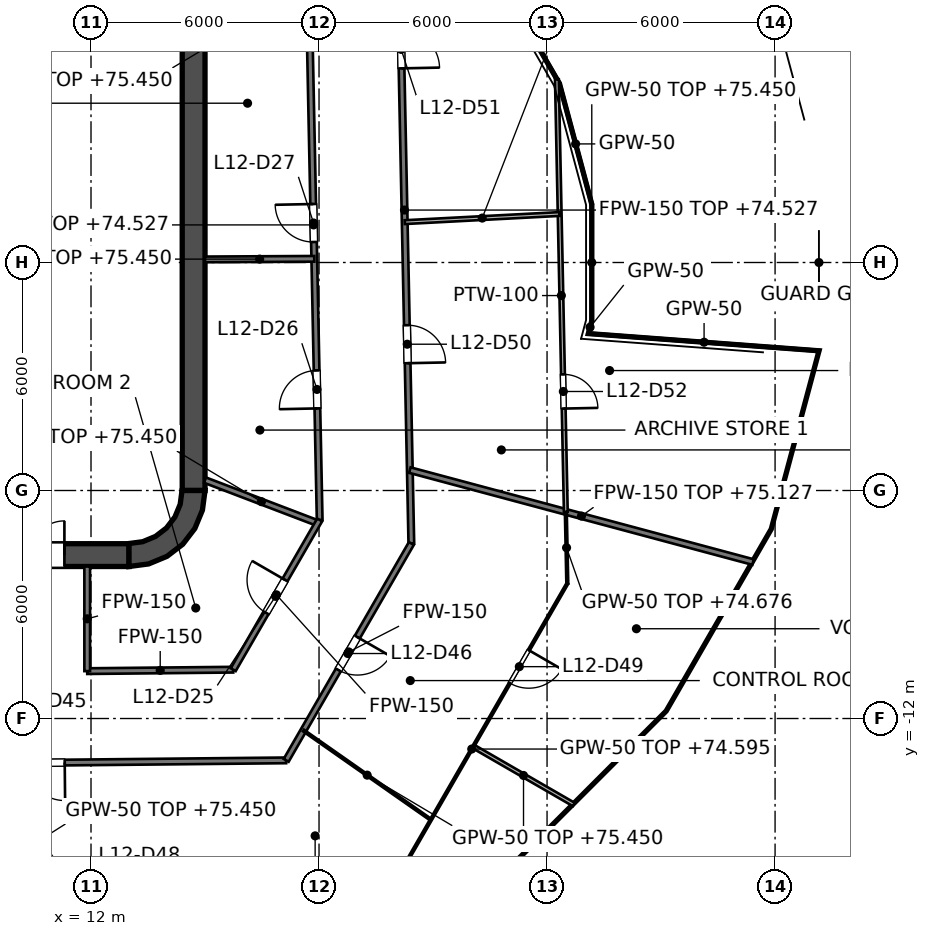
"""IFC4 building model, lengths in metres.
Left out: names, types, materials, properties, quantities, classifications, styles, units other than length and angle.
Written with IfcOpenShell. Run it as: python <this file> out.ifc"""

import sys

from ifc_helpers import new_model, si_unit, direction, frame, frame_2d, origin, place, context, subcontext, project, spatial, polyline, rectangle, outline, extrude, element, fill, save


model = new_model("IFC4")
c1 = context("Model", 3, precision=1e-05, world=origin(), true_north=direction((0.0, 1.0)))
c2 = subcontext(c1, "Body", "Model", "MODEL_VIEW")
j1 = project(units=[si_unit("LENGTHUNIT", "METRE"), si_unit("PLANEANGLEUNIT", "RADIAN")], contexts=[c1])
p1 = place(None, origin())
s1 = spatial("IfcSite", under=j1, at=p1, CompositionType="ELEMENT")
p2 = place(p1, origin())
s2 = spatial("IfcBuilding", under=s1, at=p2, CompositionType="ELEMENT")
p3 = place(p2, frame((0.0, 0.0, 71.4)))
s3 = spatial("IfcBuildingStorey", under=s2, at=p3, CompositionType="ELEMENT", Elevation=71.4)
p4 = place(p3, frame((-13.0, -7.7, 0.0), z_axis=(0.0, 0.0, 1.0), x_axis=(1.0, 0.0, 0.0)))
e1 = element("IfcWall", 1, at=p4, inside=s3, PredefinedType="SHEAR", context=c2, shape_type="SweptSolid", body=[
    extrude(rectangle(XDim=26.0, YDim=0.6, at=frame_2d((13.0, 0.0))), origin(), (0.0, 0.0, 1.0), 4.2),
])
p5 = place(p4, frame((1.7, 0.0, 0.0)))
e2 = element("IfcOpeningElement", 2, at=p5, cuts=e1, PredefinedType="OPENING", context=c2, shape_type="SweptSolid", body=[
    extrude(rectangle(XDim=1.8, YDim=2.1, at=frame_2d((0.9, 1.05))), frame((0.0, 0.3, 0.0), z_axis=(0.0, -1.0, 0.0), x_axis=(1.0, 0.0, 0.0)), (0.0, 0.0, 1.0), 0.6),
])
p6 = place(p4, frame((22.5, 0.0, 0.0)))
e3 = element("IfcOpeningElement", 3, at=p6, cuts=e1, PredefinedType="OPENING", context=c2, shape_type="SweptSolid", body=[
    extrude(rectangle(XDim=1.8, YDim=2.1, at=frame_2d((0.9, 1.05))), frame((0.0, 0.3, 0.0), z_axis=(0.0, -1.0, 0.0), x_axis=(1.0, 0.0, 0.0)), (0.0, 0.0, 1.0), 0.6),
])
p7 = place(p3, frame((14.7, -6.0, 0.0), z_axis=(0.0, 0.0, 1.0), x_axis=(0.0, 1.0, 0.0)))
e4 = element("IfcWall", 4, at=p7, inside=s3, PredefinedType="SHEAR", context=c2, shape_type="SweptSolid", body=[
    extrude(rectangle(XDim=12.0, YDim=0.6, at=frame_2d((6.0, 0.0))), origin(), (0.0, 0.0, 1.0), 4.2),
])
p8 = place(p3, origin())
e5 = element("IfcWall", 5, at=p8, inside=s3, PredefinedType="SHEAR", context=c2, shape_type="SweptSolid", body=[
    extrude(outline(polyline([(15.0, -6.0), (14.395, -6.0), (14.347, -6.361), (14.208, -6.698), (13.986, -6.986), (13.698, -7.208), (13.361, -7.347), (13.0, -7.395), (13.0, -8.0), (13.518, -7.932), (14.0, -7.732), (14.414, -7.414), (14.732, -7.0), (14.932, -6.518), (15.0, -6.0)])), origin(), (0.0, 0.0, 1.0), 4.2),
])
p9 = place(p3, frame((11.8, -7.4, 0.0), z_axis=(0.0, 0.0, 1.0), x_axis=(0.0, 1.0, 0.0)))
e6 = element("IfcWall", 6, at=p9, inside=s3, PredefinedType="SOLIDWALL", context=c2, shape_type="SweptSolid", body=[
    extrude(rectangle(XDim=14.8, YDim=0.4, at=frame_2d((7.4, 0.0))), origin(), (0.0, 0.0, 1.0), 4.05),
])
p10 = place(p9, frame((11.2, 0.0, 0.0)))
e7 = element("IfcOpeningElement", 7, at=p10, cuts=e6, PredefinedType="OPENING", context=c2, shape_type="SweptSolid", body=[
    extrude(rectangle(XDim=1.1, YDim=2.1, at=frame_2d((0.55, 1.05))), frame((0.0, 0.2, 0.0), z_axis=(0.0, -1.0, 0.0), x_axis=(1.0, 0.0, 0.0)), (0.0, 0.0, 1.0), 0.4),
])
p11 = place(p9, frame((8.3, 0.0, 0.0)))
e8 = element("IfcOpeningElement", 8, at=p11, cuts=e6, PredefinedType="OPENING", context=c2, shape_type="SweptSolid", body=[
    extrude(rectangle(XDim=1.1, YDim=2.1, at=frame_2d((0.55, 1.05))), frame((0.0, 0.2, 0.0), z_axis=(0.0, -1.0, 0.0), x_axis=(1.0, 0.0, 0.0)), (0.0, 0.0, 1.0), 0.4),
])
p12 = place(p9, frame((5.4, 0.0, 0.0)))
e9 = element("IfcOpeningElement", 9, at=p12, cuts=e6, PredefinedType="OPENING", context=c2, shape_type="SweptSolid", body=[
    extrude(rectangle(XDim=1.1, YDim=2.1, at=frame_2d((0.55, 1.05))), frame((0.0, 0.2, 0.0), z_axis=(0.0, -1.0, 0.0), x_axis=(1.0, 0.0, 0.0)), (0.0, 0.0, 1.0), 0.4),
])
p13 = place(p9, frame((13.552, 0.0, 0.0)))
e10 = element("IfcOpeningElement", 10, at=p13, cuts=e6, PredefinedType="OPENING", context=c2, shape_type="SweptSolid", body=[
    extrude(rectangle(XDim=0.9, YDim=2.1, at=frame_2d((0.45, 1.05))), frame((0.0, 0.2, 0.0), z_axis=(0.0, -1.0, 0.0), x_axis=(1.0, 0.0, 0.0)), (0.0, 0.0, 1.0), 0.4),
])
p14 = place(p9, frame((0.347, 0.0, 0.0)))
e11 = element("IfcOpeningElement", 11, at=p14, cuts=e6, PredefinedType="OPENING", context=c2, shape_type="SweptSolid", body=[
    extrude(rectangle(XDim=0.9, YDim=2.1, at=frame_2d((0.45, 1.05))), frame((0.0, 0.2, 0.0), z_axis=(0.0, -1.0, 0.0), x_axis=(1.0, 0.0, 0.0)), (0.0, 0.0, 1.0), 0.4),
])
e12 = element("IfcWall", 12, at=p8, inside=s3, PredefinedType="SOLIDWALL", context=c2, shape_type="SweptSolid", body=[
    extrude(outline(polyline([(12.0, -5.675), (12.0, -5.925), (14.15, -5.925), (14.4, -5.925), (14.4, -5.675), (14.4, -3.025), (14.4, -2.775), (14.4, -0.125), (14.4, 0.125), (14.4, 2.775), (14.4, 3.025), (14.4, 5.675), (14.4, 5.925), (14.15, 5.925), (12.0, 5.925), (12.0, 5.675), (14.15, 5.675), (14.15, 3.025), (12.0, 3.025), (12.0, 2.775), (14.15, 2.775), (14.15, 0.125), (12.0, 0.125), (12.0, -0.125), (14.15, -0.125), (14.15, -2.775), (12.0, -2.775), (12.0, -3.025), (14.15, -3.025), (14.15, -5.675), (12.0, -5.675)])), origin(), (0.0, 0.0, 1.0), 4.05),
])
p15 = place(p3, frame((17.697, 8.753, 0.0), z_axis=(0.0, 0.0, 1.0), x_axis=(0.020608181841, -0.99978762887, 0.0)))
e13 = element("IfcWall", 13, at=p15, inside=s3, PredefinedType="PARTITIONING", context=c2, shape_type="SweptSolid", body=[
    extrude(rectangle(XDim=15.531, YDim=0.15, at=frame_2d((7.766, 0.0))), origin(), (0.0, 0.0, 1.0), 3.127),
])
p16 = place(p15, frame((11.596, 0.0, 0.0)))
e14 = element("IfcOpeningElement", 14, at=p16, cuts=e13, PredefinedType="OPENING", context=c2, shape_type="SweptSolid", body=[
    extrude(rectangle(XDim=1.0, YDim=2.1, at=frame_2d((0.5, 1.05))), frame((0.0, 0.075, 0.0), z_axis=(0.0, -1.0, 0.0), x_axis=(1.0, 0.0, 0.0)), (0.0, 0.0, 1.0), 0.15),
])
p17 = place(p15, frame((7.216, 0.0, 0.0)))
e15 = element("IfcOpeningElement", 15, at=p17, cuts=e13, PredefinedType="OPENING", context=c2, shape_type="SweptSolid", body=[
    extrude(rectangle(XDim=1.0, YDim=2.1, at=frame_2d((0.5, 1.05))), frame((0.0, 0.075, 0.0), z_axis=(0.0, -1.0, 0.0), x_axis=(1.0, 0.0, 0.0)), (0.0, 0.0, 1.0), 0.15),
])
p18 = place(p3, frame((20.067, 10.155, 0.0), z_axis=(0.0, 0.0, 1.0), x_axis=(0.020611882214, -0.999787552589, 0.0)))
e16 = element("IfcWall", 16, at=p18, inside=s3, PredefinedType="PARTITIONING", context=c2, shape_type="SweptSolid", body=[
    extrude(rectangle(XDim=17.554, YDim=0.15, at=frame_2d((8.777, 0.0))), origin(), (0.0, 0.0, 1.0), 3.127),
])
p19 = place(p18, frame((11.808, 0.0, 0.0)))
e17 = element("IfcOpeningElement", 17, at=p19, cuts=e16, PredefinedType="OPENING", context=c2, shape_type="SweptSolid", body=[
    extrude(rectangle(XDim=1.0, YDim=2.1, at=frame_2d((0.5, 1.05))), frame((0.0, 0.075, 0.0), z_axis=(0.0, -1.0, 0.0), x_axis=(1.0, 0.0, 0.0)), (0.0, 0.0, 1.0), 0.15),
])
p20 = place(p18, frame((4.048, 0.0, 0.0)))
e18 = element("IfcOpeningElement", 18, at=p20, cuts=e16, PredefinedType="OPENING", context=c2, shape_type="SweptSolid", body=[
    extrude(rectangle(XDim=1.0, YDim=2.1, at=frame_2d((0.5, 1.05))), frame((0.0, 0.075, 0.0), z_axis=(0.0, -1.0, 0.0), x_axis=(1.0, 0.0, 0.0)), (0.0, 0.0, 1.0), 0.15),
])
p21 = place(p3, frame((15.0, -5.727, 0.0), z_axis=(0.0, 0.0, 1.0), x_axis=(0.934237940374, -0.356650348053, 0.0)))
e19 = element("IfcWall", 19, at=p21, inside=s3, PredefinedType="PARTITIONING", context=c2, shape_type="SweptSolid", body=[
    extrude(rectangle(XDim=3.177, YDim=0.15, at=frame_2d((1.588, 0.0))), origin(), (0.0, 0.0, 1.0), 4.05),
])
p22 = place(p3, frame((20.39, -5.463, 0.0), z_axis=(0.0, 0.0, 1.0), x_axis=(0.965917395295, -0.25885050795, 0.0)))
e20 = element("IfcWall", 20, at=p22, inside=s3, PredefinedType="PARTITIONING", context=c2, shape_type="SweptSolid", body=[
    extrude(rectangle(XDim=9.35, YDim=0.15, at=frame_2d((4.675, 0.0))), origin(), (0.0, 0.0, 1.0), 3.727),
])
p23 = place(p3, frame((15.0, 0.081, 0.0), z_axis=(0.0, 0.0, 1.0), x_axis=(0.999985231896, 0.005434702347, 0.0)))
e21 = element("IfcWall", 21, at=p23, inside=s3, PredefinedType="PARTITIONING", context=c2, shape_type="SweptSolid", body=[
    extrude(rectangle(XDim=2.875, YDim=0.15, at=frame_2d((1.438, 0.0))), origin(), (0.0, 0.0, 1.0), 4.05),
])
p24 = place(p3, frame((-14.049, -13.411, 0.0), z_axis=(0.0, 0.0, 1.0), x_axis=(0.999950729089, 0.009926701045, 0.0)))
e22 = element("IfcWall", 22, at=p24, inside=s3, PredefinedType="PARTITIONING", context=c2, shape_type="SweptSolid", body=[
    extrude(rectangle(XDim=31.186, YDim=0.15, at=frame_2d((15.593, 0.0))), origin(), (0.0, 0.0, 1.0), 3.127),
])
p25 = place(p24, frame((5.733, 0.0, 0.0)))
e23 = element("IfcOpeningElement", 23, at=p25, cuts=e22, PredefinedType="OPENING", context=c2, shape_type="SweptSolid", body=[
    extrude(rectangle(XDim=1.0, YDim=2.1, at=frame_2d((0.5, 1.05))), frame((0.0, 0.075, 0.0), z_axis=(0.0, -1.0, 0.0), x_axis=(1.0, 0.0, 0.0)), (0.0, 0.0, 1.0), 0.15),
])
p26 = place(p24, frame((14.08, 0.0, 0.0)))
e24 = element("IfcOpeningElement", 24, at=p26, cuts=e22, PredefinedType="OPENING", context=c2, shape_type="SweptSolid", body=[
    extrude(rectangle(XDim=1.0, YDim=2.1, at=frame_2d((0.5, 1.05))), frame((0.0, 0.075, 0.0), z_axis=(0.0, -1.0, 0.0), x_axis=(1.0, 0.0, 0.0)), (0.0, 0.0, 1.0), 0.15),
])
p27 = place(p24, frame((15.996, 0.0, 0.0)))
e25 = element("IfcOpeningElement", 25, at=p27, cuts=e22, PredefinedType="OPENING", context=c2, shape_type="SweptSolid", body=[
    extrude(rectangle(XDim=1.0, YDim=2.1, at=frame_2d((0.5, 1.05))), frame((0.0, 0.075, 0.0), z_axis=(0.0, -1.0, 0.0), x_axis=(1.0, 0.0, 0.0)), (0.0, 0.0, 1.0), 0.15),
])
p28 = place(p24, frame((19.94, 0.0, 0.0)))
e26 = element("IfcOpeningElement", 26, at=p28, cuts=e22, PredefinedType="OPENING", context=c2, shape_type="SweptSolid", body=[
    extrude(rectangle(XDim=1.0, YDim=2.1, at=frame_2d((0.5, 1.05))), frame((0.0, 0.075, 0.0), z_axis=(0.0, -1.0, 0.0), x_axis=(1.0, 0.0, 0.0)), (0.0, 0.0, 1.0), 0.15),
])
p29 = place(p24, frame((24.359, 0.0, 0.0)))
e27 = element("IfcOpeningElement", 27, at=p29, cuts=e22, PredefinedType="OPENING", context=c2, shape_type="SweptSolid", body=[
    extrude(rectangle(XDim=1.0, YDim=2.1, at=frame_2d((0.5, 1.05))), frame((0.0, 0.075, 0.0), z_axis=(0.0, -1.0, 0.0), x_axis=(1.0, 0.0, 0.0)), (0.0, 0.0, 1.0), 0.15),
])
p30 = place(p3, frame((11.9, -10.753, 0.0), z_axis=(0.0, 0.0, 1.0), x_axis=(0.999950870391, 0.009912456998, 0.0)))
e28 = element("IfcWall", 28, at=p30, inside=s3, PredefinedType="PARTITIONING", context=c2, shape_type="SweptSolid", body=[
    extrude(rectangle(XDim=3.842, YDim=0.15, at=frame_2d((1.921, 0.0))), origin(), (0.0, 0.0, 1.0), 3.195),
])
p31 = place(p3, frame((17.135, -13.101, 0.0), z_axis=(0.0, 0.0, 1.0), x_axis=(0.499944832242, 0.866057252562, 0.0)))
e29 = element("IfcWall", 29, at=p31, inside=s3, PredefinedType="PARTITIONING", context=c2, shape_type="SweptSolid", body=[
    extrude(rectangle(XDim=6.589, YDim=0.15, at=frame_2d((3.294, 0.0))), origin(), (0.0, 0.0, 1.0), 3.195),
])
p32 = place(p31, frame((2.746, 0.0, 0.0)))
e30 = element("IfcOpeningElement", 30, at=p32, cuts=e29, PredefinedType="OPENING", context=c2, shape_type="SweptSolid", body=[
    extrude(rectangle(XDim=1.0, YDim=2.1, at=frame_2d((0.5, 1.05))), frame((0.0, 0.075, 0.0), z_axis=(0.0, -1.0, 0.0), x_axis=(1.0, 0.0, 0.0)), (0.0, 0.0, 1.0), 0.15),
])
p33 = place(p3, frame((15.742, -10.715, 0.0), z_axis=(0.0, 0.0, 1.0), x_axis=(0.499965549051, 0.866045293135, 0.0)))
e31 = element("IfcWall", 31, at=p33, inside=s3, PredefinedType="PARTITIONING", context=c2, shape_type="SweptSolid", body=[
    extrude(rectangle(XDim=4.55, YDim=0.15, at=frame_2d((2.275, 0.0))), origin(), (0.0, 0.0, 1.0), 3.195),
])
p34 = place(p33, frame((1.728, 0.0, 0.0)))
e32 = element("IfcOpeningElement", 32, at=p34, cuts=e31, PredefinedType="OPENING", context=c2, shape_type="SweptSolid", body=[
    extrude(rectangle(XDim=1.0, YDim=2.1, at=frame_2d((0.5, 1.05))), frame((0.0, 0.075, 0.0), z_axis=(0.0, -1.0, 0.0), x_axis=(1.0, 0.0, 0.0)), (0.0, 0.0, 1.0), 0.15),
])
p35 = place(p3, frame((11.9, -10.753, 0.0), z_axis=(0.0, 0.0, 1.0), x_axis=(0.0, 1.0, 0.0)))
e33 = element("IfcWall", 33, at=p35, inside=s3, PredefinedType="PARTITIONING", context=c2, shape_type="SweptSolid", body=[
    extrude(rectangle(XDim=2.753, YDim=0.15, at=frame_2d((1.376, 0.0))), origin(), (0.0, 0.0, 1.0), 3.195),
])
p36 = place(p3, frame((24.494, -6.563, 0.0), z_axis=(0.0, 0.0, 1.0), x_axis=(0.020707532967, -0.99978557605, 0.0)))
e34 = element("IfcWall", 34, at=p36, inside=s3, PredefinedType="PARTITIONING", context=c2, shape_type="SweptSolid", body=[
    extrude(rectangle(XDim=1.886, YDim=0.05, at=frame_2d((0.943, 0.0))), origin(), (0.0, 0.0, 1.0), 3.276),
])
p37 = place(p3, frame((24.327, 4.706, 0.0), z_axis=(0.0, 0.0, 1.0), x_axis=(0.258930604243, -0.965895927202, 0.0)))
e35 = element("IfcWall", 35, at=p37, inside=s3, PredefinedType="PARTITIONING", context=c2, shape_type="SweptSolid", body=[
    extrude(rectangle(XDim=3.283, YDim=0.05, at=frame_2d((1.642, 0.0))), origin(), (0.0, 0.0, 1.0), 3.127),
])
p38 = place(p3, frame((22.349, 8.132, 0.0), z_axis=(0.0, 0.0, 1.0), x_axis=(0.500744318686, -0.865595244502, 0.0)))
e36 = element("IfcWall", 36, at=p38, inside=s3, PredefinedType="PARTITIONING", context=c2, shape_type="SweptSolid", body=[
    extrude(rectangle(XDim=3.956, YDim=0.05, at=frame_2d((1.978, 0.0))), origin(), (0.0, 0.0, 1.0), 3.127),
])
p39 = place(p3, frame((9.228, -13.18, 0.0), z_axis=(0.0, 0.0, 1.0), x_axis=(0.57366437087, -0.819090464842, 0.0)))
e37 = element("IfcWall", 37, at=p39, inside=s3, PredefinedType="PARTITIONING", context=c2, shape_type="SweptSolid", body=[
    extrude(rectangle(XDim=4.947, YDim=0.05, at=frame_2d((2.474, 0.0))), origin(), (0.0, 0.0, 1.0), 4.05),
])
p40 = place(p3, frame((17.589, -12.315, 0.0), z_axis=(0.0, 0.0, 1.0), x_axis=(0.819047072593, -0.57372632228, 0.0)))
e38 = element("IfcWall", 38, at=p40, inside=s3, PredefinedType="PARTITIONING", context=c2, shape_type="SweptSolid", body=[
    extrude(rectangle(XDim=4.096, YDim=0.05, at=frame_2d((2.048, 0.0))), origin(), (0.0, 0.0, 1.0), 4.05),
])
p41 = place(p3, frame((25.087, -1.871, 0.0), z_axis=(0.0, 0.0, 1.0), x_axis=(0.997234603804, -0.074317864441, 0.0)))
e39 = element("IfcWall", 39, at=p41, inside=s3, PredefinedType="PARTITIONING", context=c2, shape_type="SweptSolid", body=[
    extrude(rectangle(XDim=6.107, YDim=0.05, at=frame_2d((3.053, 0.0))), origin(), (0.0, 0.0, 1.0), 3.127),
])
p42 = place(p3, frame((19.504, -17.158, 0.0), z_axis=(0.0, 0.0, 1.0), x_axis=(0.500068479539, 0.865985863494, 0.0)))
e40 = element("IfcWall", 40, at=p42, inside=s3, PredefinedType="PARTITIONING", context=c2, shape_type="SweptSolid", body=[
    extrude(rectangle(XDim=10.057, YDim=0.05, at=frame_2d((5.028, 0.0))), origin(), (0.0, 0.0, 1.0), 3.195),
])
p43 = place(p42, frame((7.032, 0.0, 0.0)))
e41 = element("IfcOpeningElement", 41, at=p43, cuts=e40, PredefinedType="OPENING", context=c2, shape_type="SweptSolid", body=[
    extrude(rectangle(XDim=1.0, YDim=2.1, at=frame_2d((0.5, 1.05))), frame((0.0, 0.025, 0.0), z_axis=(0.0, -1.0, 0.0), x_axis=(1.0, 0.0, 0.0)), (0.0, 0.0, 1.0), 0.05),
])
p44 = place(p3, frame((25.087, -1.871, 0.0), z_axis=(0.0, 0.0, 1.0), x_axis=(0.258841272413, 0.965919870225, 0.0)))
e42 = element("IfcWall", 42, at=p44, inside=s3, PredefinedType="PARTITIONING", context=c2, shape_type="SweptSolid", body=[
    extrude(rectangle(XDim=0.348, YDim=0.05, at=frame_2d((0.174, 0.0))), origin(), (0.0, 0.0, 1.0), 3.127),
])
p45 = place(p3, frame((25.177, -1.535, 0.0), z_axis=(0.0, 0.0, 1.0), x_axis=(0.0, 1.0, 0.0)))
e43 = element("IfcWall", 43, at=p45, inside=s3, PredefinedType="PARTITIONING", context=c2, shape_type="SweptSolid", body=[
    extrude(rectangle(XDim=3.07, YDim=0.05, at=frame_2d((1.535, 0.0))), origin(), (0.0, 0.0, 1.0), 4.05),
])
p46 = place(p3, frame((24.259, 4.823, 0.0), z_axis=(0.0, 0.0, 1.0), x_axis=(0.020601583336, -0.99978776486, 0.0)))
e44 = element("IfcWall", 44, at=p46, inside=s3, PredefinedType="PARTITIONING", context=c2, shape_type="SweptSolid", body=[
    extrude(rectangle(XDim=11.388, YDim=0.1, at=frame_2d((5.694, 0.0))), origin(), (0.0, 0.0, 1.0), 3.127),
])
p47 = place(p46, frame((7.769, 0.0, 0.0)))
e45 = element("IfcOpeningElement", 45, at=p47, cuts=e44, PredefinedType="OPENING", context=c2, shape_type="SweptSolid", body=[
    extrude(rectangle(XDim=0.9, YDim=2.1, at=frame_2d((0.45, 1.05))), frame((0.0, 0.05, 0.0), z_axis=(0.0, -1.0, 0.0), x_axis=(1.0, 0.0, 0.0)), (0.0, 0.0, 1.0), 0.1),
])
p48 = place(p3, frame((22.058, -12.735, 0.0), z_axis=(0.0, 0.0, 1.0), x_axis=(0.866011219312, -0.500024567422, 0.0)))
e46 = element("IfcWall", 46, at=p48, inside=s3, PredefinedType="PARTITIONING", context=c2, shape_type="SweptSolid", body=[
    extrude(rectangle(XDim=3.054, YDim=0.1, at=frame_2d((1.527, 0.0))), origin(), (0.0, 0.0, 1.0), 3.352),
])
p49 = place(p3, frame((20.256, 1.062, 0.0), z_axis=(0.0, 0.0, 1.0), x_axis=(0.998626243597, 0.052398717544, 0.0)))
e47 = element("IfcWall", 47, at=p49, inside=s3, PredefinedType="PARTITIONING", context=c2, shape_type="SweptSolid", body=[
    extrude(rectangle(XDim=4.082, YDim=0.1, at=frame_2d((2.041, 0.0))), origin(), (0.0, 0.0, 1.0), 4.05),
])
p50 = place(p10, origin())
e48 = element("IfcDoor", 48, at=p50, inside=s3, OperationType="DOUBLE_DOOR_SLIDING", PredefinedType="DOOR", context=c2, shape_type="SweptSolid", body=[
    extrude(rectangle(XDim=1.1, YDim=2.1, at=frame_2d((0.55, 1.05))), frame((0.0, 0.025, 0.0), z_axis=(0.0, -1.0, 0.0), x_axis=(1.0, 0.0, 0.0)), (0.0, 0.0, 1.0), 0.05),
])
fill(e7, e48)
p51 = place(p11, origin())
e49 = element("IfcDoor", 49, at=p51, inside=s3, OperationType="DOUBLE_DOOR_SLIDING", PredefinedType="DOOR", context=c2, shape_type="SweptSolid", body=[
    extrude(rectangle(XDim=1.1, YDim=2.1, at=frame_2d((0.55, 1.05))), frame((0.0, 0.025, 0.0), z_axis=(0.0, -1.0, 0.0), x_axis=(1.0, 0.0, 0.0)), (0.0, 0.0, 1.0), 0.05),
])
fill(e8, e49)
p52 = place(p12, origin())
e50 = element("IfcDoor", 50, at=p52, inside=s3, OperationType="DOUBLE_DOOR_SLIDING", PredefinedType="DOOR", context=c2, shape_type="SweptSolid", body=[
    extrude(rectangle(XDim=1.1, YDim=2.1, at=frame_2d((0.55, 1.05))), frame((0.0, 0.025, 0.0), z_axis=(0.0, -1.0, 0.0), x_axis=(1.0, 0.0, 0.0)), (0.0, 0.0, 1.0), 0.05),
])
fill(e9, e50)
p53 = place(p14, origin())
e51 = element("IfcDoor", 51, at=p53, inside=s3, OperationType="SINGLE_SWING_RIGHT", PredefinedType="DOOR", context=c2, shape_type="SweptSolid", body=[
    extrude(rectangle(XDim=0.9, YDim=2.1, at=frame_2d((0.45, 1.05))), frame((0.0, 0.025, 0.0), z_axis=(0.0, -1.0, 0.0), x_axis=(1.0, 0.0, 0.0)), (0.0, 0.0, 1.0), 0.05),
])
fill(e11, e51)
p54 = place(p6, origin())
e52 = element("IfcDoor", 52, at=p54, inside=s3, OperationType="DOUBLE_DOOR_SINGLE_SWING", PredefinedType="DOOR", context=c2, shape_type="SweptSolid", body=[
    extrude(rectangle(XDim=1.8, YDim=2.1, at=frame_2d((0.9, 1.05))), frame((0.0, 0.025, 0.0), z_axis=(0.0, -1.0, 0.0), x_axis=(1.0, 0.0, 0.0)), (0.0, 0.0, 1.0), 0.05),
])
fill(e3, e52)
p55 = place(p34, origin())
e53 = element("IfcDoor", 53, at=p55, inside=s3, OperationType="SINGLE_SWING_RIGHT", PredefinedType="DOOR", context=c2, shape_type="SweptSolid", body=[
    extrude(rectangle(XDim=1.0, YDim=2.1, at=frame_2d((0.5, 1.05))), frame((0.0, 0.025, 0.0), z_axis=(0.0, -1.0, 0.0), x_axis=(1.0, 0.0, 0.0)), (0.0, 0.0, 1.0), 0.05),
])
fill(e32, e53)
p56 = place(p16, origin())
e54 = element("IfcDoor", 54, at=p56, inside=s3, OperationType="SINGLE_SWING_RIGHT", PredefinedType="DOOR", context=c2, shape_type="SweptSolid", body=[
    extrude(rectangle(XDim=1.0, YDim=2.1, at=frame_2d((0.5, 1.05))), frame((0.0, 0.025, 0.0), z_axis=(0.0, -1.0, 0.0), x_axis=(1.0, 0.0, 0.0)), (0.0, 0.0, 1.0), 0.05),
])
fill(e14, e54)
p57 = place(p17, origin())
e55 = element("IfcDoor", 55, at=p57, inside=s3, OperationType="SINGLE_SWING_LEFT", PredefinedType="DOOR", context=c2, shape_type="SweptSolid", body=[
    extrude(rectangle(XDim=1.0, YDim=2.1, at=frame_2d((0.5, 1.05))), frame((0.0, 0.025, 0.0), z_axis=(0.0, -1.0, 0.0), x_axis=(1.0, 0.0, 0.0)), (0.0, 0.0, 1.0), 0.05),
])
fill(e15, e55)
p58 = place(p29, origin())
e56 = element("IfcDoor", 56, at=p58, inside=s3, OperationType="SINGLE_SWING_RIGHT", PredefinedType="DOOR", context=c2, shape_type="SweptSolid", body=[
    extrude(rectangle(XDim=1.0, YDim=2.1, at=frame_2d((0.5, 1.05))), frame((0.0, 0.025, 0.0), z_axis=(0.0, -1.0, 0.0), x_axis=(1.0, 0.0, 0.0)), (0.0, 0.0, 1.0), 0.05),
])
fill(e27, e56)
p59 = place(p32, origin())
e57 = element("IfcDoor", 57, at=p59, inside=s3, OperationType="SINGLE_SWING_RIGHT", PredefinedType="DOOR", context=c2, shape_type="SweptSolid", body=[
    extrude(rectangle(XDim=1.0, YDim=2.1, at=frame_2d((0.5, 1.05))), frame((0.0, 0.025, 0.0), z_axis=(0.0, -1.0, 0.0), x_axis=(1.0, 0.0, 0.0)), (0.0, 0.0, 1.0), 0.05),
])
fill(e30, e57)
p60 = place(p43, origin())
e58 = element("IfcDoor", 58, at=p60, inside=s3, OperationType="SINGLE_SWING_RIGHT", PredefinedType="DOOR", context=c2, shape_type="SweptSolid", body=[
    extrude(rectangle(XDim=1.0, YDim=2.1, at=frame_2d((0.5, 1.05))), frame((0.0, 0.025, 0.0), z_axis=(0.0, -1.0, 0.0), x_axis=(1.0, 0.0, 0.0)), (0.0, 0.0, 1.0), 0.05),
])
fill(e41, e58)
p61 = place(p19, origin())
e59 = element("IfcDoor", 59, at=p61, inside=s3, OperationType="SINGLE_SWING_RIGHT", PredefinedType="DOOR", context=c2, shape_type="SweptSolid", body=[
    extrude(rectangle(XDim=1.0, YDim=2.1, at=frame_2d((0.5, 1.05))), frame((0.0, 0.025, 0.0), z_axis=(0.0, -1.0, 0.0), x_axis=(1.0, 0.0, 0.0)), (0.0, 0.0, 1.0), 0.05),
])
fill(e17, e59)
p62 = place(p20, origin())
e60 = element("IfcDoor", 60, at=p62, inside=s3, OperationType="SINGLE_SWING_RIGHT", PredefinedType="DOOR", context=c2, shape_type="SweptSolid", body=[
    extrude(rectangle(XDim=1.0, YDim=2.1, at=frame_2d((0.5, 1.05))), frame((0.0, 0.025, 0.0), z_axis=(0.0, -1.0, 0.0), x_axis=(1.0, 0.0, 0.0)), (0.0, 0.0, 1.0), 0.05),
])
fill(e18, e60)
p63 = place(p47, origin())
e61 = element("IfcDoor", 61, at=p63, inside=s3, OperationType="SINGLE_SWING_RIGHT", PredefinedType="DOOR", context=c2, shape_type="SweptSolid", body=[
    extrude(rectangle(XDim=0.9, YDim=2.1, at=frame_2d((0.45, 1.05))), frame((0.0, 0.025, 0.0), z_axis=(0.0, -1.0, 0.0), x_axis=(1.0, 0.0, 0.0)), (0.0, 0.0, 1.0), 0.05),
])
fill(e45, e61)
save(model, sys.argv[1])
